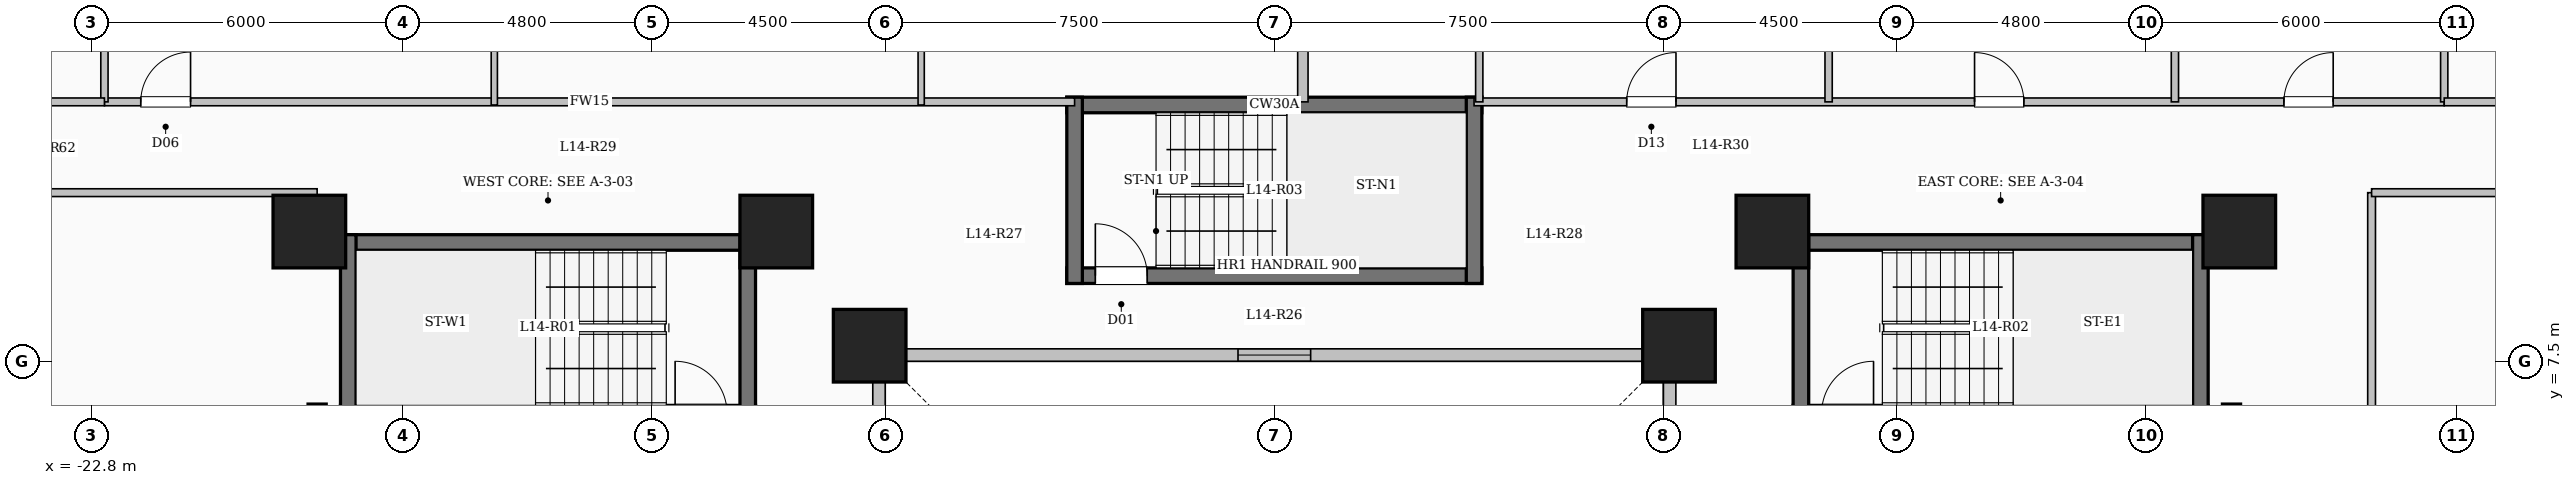
"""IFC4 building model, lengths in metres.
Left out: names, types, materials, properties, quantities, classifications, styles, units other than length and angle.
Written with IfcOpenShell. Run it as: python <this file> out.ifc"""

import sys

from ifc_helpers import new_model, si_unit, direction, frame, frame_2d, origin, origin_2d, place, context, subcontext, project, spatial, rectangle, extrude, element, fill, save


model = new_model("IFC4")
c1 = context("Model", 3, precision=1e-05, world=origin(), true_north=direction((0.0, 1.0)))
c2 = subcontext(c1, "Body", "Model", "MODEL_VIEW")
j1 = project(units=[si_unit("LENGTHUNIT", "METRE"), si_unit("PLANEANGLEUNIT", "RADIAN")], contexts=[c1])
p1 = place(None, origin())
s1 = spatial("IfcSite", under=j1, at=p1, CompositionType="ELEMENT")
p2 = place(p1, origin())
s2 = spatial("IfcBuilding", under=s1, at=p2, CompositionType="ELEMENT")
p3 = place(p2, frame((0.0, 0.0, 54.15)))
s3 = spatial("IfcBuildingStorey", under=s2, at=p3, CompositionType="ELEMENT", Elevation=54.15)
for number, where, z_axis, x_axis in (
    (1, (-7.8, 7.8, 0.0), (0.0, 0.0, 1.0), (1.0, 0.0, 0.0)),
    (2, (7.8, 7.8, 0.0), (0.0, 0.0, 1.0), (1.0, 0.0, 0.0)),
    (3, (-9.6, 10.0, 0.0), (0.0, 0.0, 1.0), (1.0, 0.0, 0.0)),
    (4, (9.6, 10.0, 0.0), (0.0, 0.0, 1.0), (1.0, 0.0, 0.0)),
    (5, (-18.6, 10.0, 0.0), (0.0, 0.0, 1.0), (1.0, 0.0, 0.0)),
    (6, (18.6, 10.0, 0.0), (0.0, 0.0, 1.0), (1.0, 0.0, 0.0)),
):
    element("IfcColumn", number, at=place(p3, frame(where, z_axis=z_axis, x_axis=x_axis)), inside=s3, PredefinedType="COLUMN", context=c2, shape_type="SweptSolid", body=[
        extrude(rectangle(XDim=1.4, YDim=1.4, at=origin_2d()), origin(), (0.0, 0.0, 1.0), 3.35),
    ])
p4 = place(p3, frame((7.62, -7.62, 0.0), z_axis=(0.0, 0.0, 1.0), x_axis=(0.0, 1.0, 0.0)))
e7 = element("IfcWall", 7, at=p4, inside=s3, PredefinedType="SOLIDWALL", context=c2, shape_type="SweptSolid", body=[
    extrude(rectangle(XDim=15.24, YDim=0.24, at=frame_2d((7.62, 0.0))), origin(), (0.0, 0.0, 1.0), 3.1),
])
p5 = place(p4, frame((6.92, 0.0, 0.95)))
e8 = element("IfcOpeningElement", 8, at=p5, cuts=e7, PredefinedType="OPENING", context=c2, shape_type="SweptSolid", body=[
    extrude(rectangle(XDim=1.4, YDim=1.5, at=frame_2d((0.7, 0.75))), frame((0.0, 0.13, 0.0), z_axis=(0.0, -1.0, 0.0), x_axis=(1.0, 0.0, 0.0)), (0.0, 0.0, 1.0), 0.26),
])
p6 = place(p3, frame((7.62, 7.62, 0.0), z_axis=(0.0, 0.0, 1.0), x_axis=(-1.0, 0.0, 0.0)))
e9 = element("IfcWall", 9, at=p6, inside=s3, PredefinedType="SOLIDWALL", context=c2, shape_type="SweptSolid", body=[
    extrude(rectangle(XDim=15.24, YDim=0.24, at=frame_2d((7.62, 0.0))), origin(), (0.0, 0.0, 1.0), 3.1),
])
p7 = place(p6, frame((6.92, 0.0, 0.95)))
e10 = element("IfcOpeningElement", 10, at=p7, cuts=e9, PredefinedType="OPENING", context=c2, shape_type="SweptSolid", body=[
    extrude(rectangle(XDim=1.4, YDim=1.5, at=frame_2d((0.7, 0.75))), frame((0.0, 0.13, 0.0), z_axis=(0.0, -1.0, 0.0), x_axis=(1.0, 0.0, 0.0)), (0.0, 0.0, 1.0), 0.26),
])
p8 = place(p3, frame((-7.62, 7.62, 0.0), z_axis=(0.0, 0.0, 1.0), x_axis=(0.0, -1.0, 0.0)))
e11 = element("IfcWall", 11, at=p8, inside=s3, PredefinedType="SOLIDWALL", context=c2, shape_type="SweptSolid", body=[
    extrude(rectangle(XDim=15.24, YDim=0.24, at=frame_2d((7.62, 0.0))), origin(), (0.0, 0.0, 1.0), 3.1),
])
p9 = place(p8, frame((6.92, 0.0, 0.95)))
e12 = element("IfcOpeningElement", 12, at=p9, cuts=e11, PredefinedType="OPENING", context=c2, shape_type="SweptSolid", body=[
    extrude(rectangle(XDim=1.4, YDim=1.5, at=frame_2d((0.7, 0.75))), frame((0.0, 0.13, 0.0), z_axis=(0.0, -1.0, 0.0), x_axis=(1.0, 0.0, 0.0)), (0.0, 0.0, 1.0), 0.26),
])
p10 = place(p3, frame((-18.0, 9.79, 0.0), z_axis=(0.0, 0.0, 1.0), x_axis=(1.0, 0.0, 0.0)))
e13 = element("IfcWall", 13, at=p10, inside=s3, PredefinedType="SHEAR", context=c2, shape_type="SweptSolid", body=[
    extrude(rectangle(XDim=8.0, YDim=0.3, at=frame_2d((4.0, 0.0))), origin(), (0.0, 0.0, 1.0), 3.35),
])
p11 = place(p3, frame((-18.0, 6.5, 0.0), z_axis=(0.0, 0.0, 1.0), x_axis=(1.0, 0.0, 0.0)))
e14 = element("IfcWall", 14, at=p11, inside=s3, PredefinedType="SHEAR", context=c2, shape_type="SweptSolid", body=[
    extrude(rectangle(XDim=8.0, YDim=0.3, at=frame_2d((4.0, 0.0))), origin(), (0.0, 0.0, 1.0), 3.35),
])
p12 = place(p11, frame((6.45, 0.0, 0.0)))
e15 = element("IfcOpeningElement", 15, at=p12, cuts=e14, PredefinedType="OPENING", context=c2, shape_type="SweptSolid", body=[
    extrude(rectangle(XDim=1.0, YDim=2.15, at=frame_2d((0.5, 1.075))), frame((0.0, 0.16, 0.0), z_axis=(0.0, -1.0, 0.0), x_axis=(1.0, 0.0, 0.0)), (0.0, 0.0, 1.0), 0.32),
])
for number, where, z_axis, x_axis in (
    (16, (-17.85, 6.35, 0.0), (0.0, 0.0, 1.0), (0.0, 1.0, 0.0)),
    (17, (-10.15, 6.35, 0.0), (0.0, 0.0, 1.0), (0.0, 1.0, 0.0)),
):
    element("IfcWall", number, at=place(p3, frame(where, z_axis=z_axis, x_axis=x_axis)), inside=s3, PredefinedType="SHEAR", context=c2, shape_type="SweptSolid", body=[
        extrude(rectangle(XDim=3.59, YDim=0.3, at=frame_2d((1.795, 0.0))), origin(), (0.0, 0.0, 1.0), 3.35),
    ])
p13 = place(p3, frame((10.0, 9.79, 0.0), z_axis=(0.0, 0.0, 1.0), x_axis=(1.0, 0.0, 0.0)))
e18 = element("IfcWall", 18, at=p13, inside=s3, PredefinedType="SHEAR", context=c2, shape_type="SweptSolid", body=[
    extrude(rectangle(XDim=8.0, YDim=0.3, at=frame_2d((4.0, 0.0))), origin(), (0.0, 0.0, 1.0), 3.35),
])
p14 = place(p3, frame((10.0, 6.5, 0.0), z_axis=(0.0, 0.0, 1.0), x_axis=(1.0, 0.0, 0.0)))
e19 = element("IfcWall", 19, at=p14, inside=s3, PredefinedType="SHEAR", context=c2, shape_type="SweptSolid", body=[
    extrude(rectangle(XDim=8.0, YDim=0.3, at=frame_2d((4.0, 0.0))), origin(), (0.0, 0.0, 1.0), 3.35),
])
p15 = place(p14, frame((0.55, 0.0, 0.0)))
e20 = element("IfcOpeningElement", 20, at=p15, cuts=e19, PredefinedType="OPENING", context=c2, shape_type="SweptSolid", body=[
    extrude(rectangle(XDim=1.0, YDim=2.15, at=frame_2d((0.5, 1.075))), frame((0.0, 0.16, 0.0), z_axis=(0.0, -1.0, 0.0), x_axis=(1.0, 0.0, 0.0)), (0.0, 0.0, 1.0), 0.32),
])
for number, where, z_axis, x_axis in (
    (21, (10.15, 6.35, 0.0), (0.0, 0.0, 1.0), (0.0, 1.0, 0.0)),
    (22, (17.85, 6.35, 0.0), (0.0, 0.0, 1.0), (0.0, 1.0, 0.0)),
):
    element("IfcWall", number, at=place(p3, frame(where, z_axis=z_axis, x_axis=x_axis)), inside=s3, PredefinedType="SHEAR", context=c2, shape_type="SweptSolid", body=[
        extrude(rectangle(XDim=3.59, YDim=0.3, at=frame_2d((1.795, 0.0))), origin(), (0.0, 0.0, 1.0), 3.35),
    ])
p16 = place(p3, frame((-4.0, 12.44, 0.0), z_axis=(0.0, 0.0, 1.0), x_axis=(1.0, 0.0, 0.0)))
e23 = element("IfcWall", 23, at=p16, inside=s3, PredefinedType="SHEAR", context=c2, shape_type="SweptSolid", body=[
    extrude(rectangle(XDim=8.0, YDim=0.3, at=frame_2d((4.0, 0.0))), origin(), (0.0, 0.0, 1.0), 3.35),
])
p17 = place(p3, frame((-4.0, 9.15, 0.0), z_axis=(0.0, 0.0, 1.0), x_axis=(1.0, 0.0, 0.0)))
e24 = element("IfcWall", 24, at=p17, inside=s3, PredefinedType="SHEAR", context=c2, shape_type="SweptSolid", body=[
    extrude(rectangle(XDim=8.0, YDim=0.3, at=frame_2d((4.0, 0.0))), origin(), (0.0, 0.0, 1.0), 3.35),
])
p18 = place(p17, frame((0.55, 0.0, 0.0)))
e25 = element("IfcOpeningElement", 25, at=p18, cuts=e24, PredefinedType="OPENING", context=c2, shape_type="SweptSolid", body=[
    extrude(rectangle(XDim=1.0, YDim=2.15, at=frame_2d((0.5, 1.075))), frame((0.0, 0.16, 0.0), z_axis=(0.0, -1.0, 0.0), x_axis=(1.0, 0.0, 0.0)), (0.0, 0.0, 1.0), 0.32),
])
for number, where, z_axis, x_axis in (
    (26, (-3.85, 9.0, 0.0), (0.0, 0.0, 1.0), (0.0, 1.0, 0.0)),
    (27, (3.85, 9.0, 0.0), (0.0, 0.0, 1.0), (0.0, 1.0, 0.0)),
):
    element("IfcWall", number, at=place(p3, frame(where, z_axis=z_axis, x_axis=x_axis)), inside=s3, PredefinedType="SHEAR", context=c2, shape_type="SweptSolid", body=[
        extrude(rectangle(XDim=3.59, YDim=0.3, at=frame_2d((1.795, 0.0))), origin(), (0.0, 0.0, 1.0), 3.35),
    ])
for number, where, z_axis, x_axis in (
    (28, (-18.45, -7.375, 0.0), (0.0, 0.0, 1.0), (0.0, 1.0, 0.0)),
    (29, (18.45, -7.375, 0.0), (0.0, 0.0, 1.0), (0.0, 1.0, 0.0)),
):
    element("IfcWall", number, at=place(p3, frame(where, z_axis=z_axis, x_axis=x_axis)), inside=s3, PredefinedType="SHEAR", context=c2, shape_type="SweptSolid", body=[
        extrude(rectangle(XDim=14.05, YDim=0.35, at=frame_2d((7.025, 0.0))), origin(), (0.0, 0.0, 1.0), 3.35),
    ])
p19 = place(p3, frame((-22.55, 12.5, 0.0), z_axis=(0.0, 0.0, 1.0), x_axis=(1.0, 0.0, 0.0)))
e30 = element("IfcWall", 30, at=p19, inside=s3, PredefinedType="PARTITIONING", context=c2, shape_type="SweptSolid", body=[
    extrude(rectangle(XDim=18.7, YDim=0.15, at=frame_2d((9.35, 0.0))), origin(), (0.0, 0.0, 1.0), 3.1),
])
p20 = place(p19, frame((0.7, 0.0, 0.0)))
e31 = element("IfcOpeningElement", 31, at=p20, cuts=e30, PredefinedType="OPENING", context=c2, shape_type="SweptSolid", body=[
    extrude(rectangle(XDim=0.96, YDim=2.15, at=frame_2d((0.48, 1.075))), frame((0.0, 0.085, 0.0), z_axis=(0.0, -1.0, 0.0), x_axis=(1.0, 0.0, 0.0)), (0.0, 0.0, 1.0), 0.17),
])
p21 = place(p3, frame((3.85, 12.5, 0.0), z_axis=(0.0, 0.0, 1.0), x_axis=(1.0, 0.0, 0.0)))
e32 = element("IfcWall", 32, at=p21, inside=s3, PredefinedType="PARTITIONING", context=c2, shape_type="SweptSolid", body=[
    extrude(rectangle(XDim=18.7, YDim=0.15, at=frame_2d((9.35, 0.0))), origin(), (0.0, 0.0, 1.0), 3.1),
])
p22 = place(p21, frame((2.942, 0.0, 0.0)))
e33 = element("IfcOpeningElement", 33, at=p22, cuts=e32, PredefinedType="OPENING", context=c2, shape_type="SweptSolid", body=[
    extrude(rectangle(XDim=0.95, YDim=2.15, at=frame_2d((0.475, 1.075))), frame((0.0, 0.085, 0.0), z_axis=(0.0, -1.0, 0.0), x_axis=(1.0, 0.0, 0.0)), (0.0, 0.0, 1.0), 0.17),
])
p23 = place(p21, frame((9.647, 0.0, 0.0)))
e34 = element("IfcOpeningElement", 34, at=p23, cuts=e32, PredefinedType="OPENING", context=c2, shape_type="SweptSolid", body=[
    extrude(rectangle(XDim=0.95, YDim=2.15, at=frame_2d((0.475, 1.075))), frame((0.0, 0.085, 0.0), z_axis=(0.0, -1.0, 0.0), x_axis=(1.0, 0.0, 0.0)), (0.0, 0.0, 1.0), 0.17),
])
p24 = place(p21, frame((15.61, 0.0, 0.0)))
e35 = element("IfcOpeningElement", 35, at=p24, cuts=e32, PredefinedType="OPENING", context=c2, shape_type="SweptSolid", body=[
    extrude(rectangle(XDim=0.95, YDim=2.15, at=frame_2d((0.475, 1.075))), frame((0.0, 0.085, 0.0), z_axis=(0.0, -1.0, 0.0), x_axis=(1.0, 0.0, 0.0)), (0.0, 0.0, 1.0), 0.17),
])
p25 = place(p3, frame((21.15, -7.25, 0.0), z_axis=(0.0, 0.0, 1.0), x_axis=(0.0, 1.0, 0.0)))
e36 = element("IfcWall", 36, at=p25, inside=s3, PredefinedType="PARTITIONING", context=c2, shape_type="SweptSolid", body=[
    extrude(rectangle(XDim=18.0, YDim=0.15, at=frame_2d((9.0, 0.0))), origin(), (0.0, 0.0, 1.0), 2.585),
])
p26 = place(p3, frame((0.55, 12.5, 0.0), z_axis=(0.0, 0.0, 1.0), x_axis=(0.0, 1.0, 0.0)))
e37 = element("IfcWall", 37, at=p26, inside=s3, PredefinedType="SOLIDWALL", context=c2, shape_type="SweptSolid", body=[
    extrude(rectangle(XDim=12.58, YDim=0.2, at=frame_2d((6.29, 0.0))), origin(), (0.0, 0.0, 1.0), 3.1),
])
p27 = place(p3, frame((-15.035, 12.44, 0.0), z_axis=(0.0, 0.0, 1.0), x_axis=(0.0, 1.0, 0.0)))
e38 = element("IfcWall", 38, at=p27, inside=s3, PredefinedType="PARTITIONING", context=c2, shape_type="SweptSolid", body=[
    extrude(rectangle(XDim=11.16, YDim=0.12, at=frame_2d((5.58, 0.0))), origin(), (0.0, 0.0, 1.0), 2.435),
])
p28 = place(p27, frame((2.905, 0.0, 0.0)))
e39 = element("IfcOpeningElement", 39, at=p28, cuts=e38, PredefinedType="OPENING", context=c2, shape_type="SweptSolid", body=[
    extrude(rectangle(XDim=1.08, YDim=2.15, at=frame_2d((0.54, 1.075))), frame((0.0, 0.07, 0.0), z_axis=(0.0, -1.0, 0.0), x_axis=(1.0, 0.0, 0.0)), (0.0, 0.0, 1.0), 0.14),
])
p29 = place(p3, frame((-6.807, 12.44, 0.0), z_axis=(0.0, 0.0, 1.0), x_axis=(0.0, 1.0, 0.0)))
e40 = element("IfcWall", 40, at=p29, inside=s3, PredefinedType="PARTITIONING", context=c2, shape_type="SweptSolid", body=[
    extrude(rectangle(XDim=2.62, YDim=0.12, at=frame_2d((1.31, 0.0))), origin(), (0.0, 0.0, 1.0), 3.1),
])
p30 = place(p3, frame((3.95, 12.5, 0.0), z_axis=(0.0, 0.0, 1.0), x_axis=(0.0, 1.0, 0.0)))
e41 = element("IfcWall", 41, at=p30, inside=s3, PredefinedType="PARTITIONING", context=c2, shape_type="SweptSolid", body=[
    extrude(rectangle(XDim=11.05, YDim=0.14, at=frame_2d((5.525, 0.0))), origin(), (0.0, 0.0, 1.0), 3.1),
])
p31 = place(p30, frame((1.2, 0.0, 0.0)))
e42 = element("IfcOpeningElement", 42, at=p31, cuts=e41, PredefinedType="OPENING", context=c2, shape_type="SweptSolid", body=[
    extrude(rectangle(XDim=0.95, YDim=2.15, at=frame_2d((0.475, 1.075))), frame((0.0, 0.08, 0.0), z_axis=(0.0, -1.0, 0.0), x_axis=(1.0, 0.0, 0.0)), (0.0, 0.0, 1.0), 0.16),
])
for number, where, z_axis, x_axis in (
    (43, (10.684, 12.5, 0.0), (0.0, 0.0, 1.0), (0.0, 1.0, 0.0)),
    (44, (17.359, 12.5, 0.0), (0.0, 0.0, 1.0), (0.0, 1.0, 0.0)),
):
    element("IfcWall", number, at=place(p3, frame(where, z_axis=z_axis, x_axis=x_axis)), inside=s3, PredefinedType="PARTITIONING", context=c2, shape_type="SweptSolid", body=[
        extrude(rectangle(XDim=11.05, YDim=0.14, at=frame_2d((5.525, 0.0))), origin(), (0.0, 0.0, 1.0), 3.1),
    ])
p32 = place(p3, frame((-28.68, 10.75, 0.0), z_axis=(0.0, 0.0, 1.0), x_axis=(1.0, 0.0, 0.0)))
e45 = element("IfcWall", 45, at=p32, inside=s3, PredefinedType="PARTITIONING", context=c2, shape_type="SweptSolid", body=[
    extrude(rectangle(XDim=10.23, YDim=0.15, at=frame_2d((5.115, 0.0))), origin(), (0.0, 0.0, 1.0), 3.1),
])
p33 = place(p3, frame((21.15, 10.75, 0.0), z_axis=(0.0, 0.0, 1.0), x_axis=(1.0, 0.0, 0.0)))
e46 = element("IfcWall", 46, at=p33, inside=s3, PredefinedType="PARTITIONING", context=c2, shape_type="SweptSolid", body=[
    extrude(rectangle(XDim=7.53, YDim=0.15, at=frame_2d((3.765, 0.0))), origin(), (0.0, 0.0, 1.0), 3.1),
])
for number, where, z_axis, x_axis in (
    (47, (-22.55, 12.5, 0.0), (0.0, 0.0, 1.0), (0.0, 1.0, 0.0)),
    (48, (22.55, 12.5, 0.0), (0.0, 0.0, 1.0), (0.0, 1.0, 0.0)),
):
    element("IfcWall", number, at=place(p3, frame(where, z_axis=z_axis, x_axis=x_axis)), inside=s3, PredefinedType="PARTITIONING", context=c2, shape_type="SweptSolid", body=[
        extrude(rectangle(XDim=6.55, YDim=0.14, at=frame_2d((3.275, 0.0))), origin(), (0.0, 0.0, 1.0), 3.1),
    ])
p34 = place(p3, frame((-28.68, 12.5, 0.0), z_axis=(0.0, 0.0, 1.0), x_axis=(1.0, 0.0, 0.0)))
e49 = element("IfcWall", 49, at=p34, inside=s3, PredefinedType="PARTITIONING", context=c2, shape_type="SweptSolid", body=[
    extrude(rectangle(XDim=6.13, YDim=0.15, at=frame_2d((3.065, 0.0))), origin(), (0.0, 0.0, 1.0), 3.1),
])
p35 = place(p34, frame((2.59, 0.0, 0.0)))
e50 = element("IfcOpeningElement", 50, at=p35, cuts=e49, PredefinedType="OPENING", context=c2, shape_type="SweptSolid", body=[
    extrude(rectangle(XDim=0.95, YDim=2.15, at=frame_2d((0.475, 1.075))), frame((0.0, 0.085, 0.0), z_axis=(0.0, -1.0, 0.0), x_axis=(1.0, 0.0, 0.0)), (0.0, 0.0, 1.0), 0.17),
])
p36 = place(p3, frame((22.55, 12.5, 0.0), z_axis=(0.0, 0.0, 1.0), x_axis=(1.0, 0.0, 0.0)))
e51 = element("IfcWall", 51, at=p36, inside=s3, PredefinedType="PARTITIONING", context=c2, shape_type="SweptSolid", body=[
    extrude(rectangle(XDim=6.13, YDim=0.15, at=frame_2d((3.065, 0.0))), origin(), (0.0, 0.0, 1.0), 3.1),
])
p37 = place(p36, frame((2.59, 0.0, 0.0)))
e52 = element("IfcOpeningElement", 52, at=p37, cuts=e51, PredefinedType="OPENING", context=c2, shape_type="SweptSolid", body=[
    extrude(rectangle(XDim=0.95, YDim=2.15, at=frame_2d((0.475, 1.075))), frame((0.0, 0.085, 0.0), z_axis=(0.0, -1.0, 0.0), x_axis=(1.0, 0.0, 0.0)), (0.0, 0.0, 1.0), 0.17),
])
p38 = place(p7, origin())
e53 = element("IfcWindow", 53, at=p38, inside=s3, PartitioningType="SINGLE_PANEL", PredefinedType="WINDOW", context=c2, shape_type="SweptSolid", body=[
    extrude(rectangle(XDim=1.4, YDim=1.5, at=frame_2d((0.7, 0.75))), frame((0.0, 0.03, 0.0), z_axis=(0.0, -1.0, 0.0), x_axis=(1.0, 0.0, 0.0)), (0.0, 0.0, 1.0), 0.06),
])
fill(e10, e53)
p39 = place(p18, origin())
e54 = element("IfcDoor", 54, at=p39, inside=s3, OperationType="SINGLE_SWING_LEFT", PredefinedType="DOOR", context=c2, shape_type="SweptSolid", body=[
    extrude(rectangle(XDim=1.0, YDim=2.15, at=frame_2d((0.5, 1.075))), frame((0.0, 0.025, 0.0), z_axis=(0.0, -1.0, 0.0), x_axis=(1.0, 0.0, 0.0)), (0.0, 0.0, 1.0), 0.05),
])
fill(e25, e54)
p40 = place(p20, origin())
e55 = element("IfcDoor", 55, at=p40, inside=s3, OperationType="SINGLE_SWING_RIGHT", PredefinedType="DOOR", context=c2, shape_type="SweptSolid", body=[
    extrude(rectangle(XDim=0.96, YDim=2.15, at=frame_2d((0.48, 1.075))), frame((0.0, 0.025, 0.0), z_axis=(0.0, -1.0, 0.0), x_axis=(1.0, 0.0, 0.0)), (0.0, 0.0, 1.0), 0.05),
])
fill(e31, e55)
p41 = place(p22, origin())
e56 = element("IfcDoor", 56, at=p41, inside=s3, OperationType="SINGLE_SWING_RIGHT", PredefinedType="DOOR", context=c2, shape_type="SweptSolid", body=[
    extrude(rectangle(XDim=0.95, YDim=2.15, at=frame_2d((0.475, 1.075))), frame((0.0, 0.025, 0.0), z_axis=(0.0, -1.0, 0.0), x_axis=(1.0, 0.0, 0.0)), (0.0, 0.0, 1.0), 0.05),
])
fill(e33, e56)
p42 = place(p23, origin())
e57 = element("IfcDoor", 57, at=p42, inside=s3, OperationType="SINGLE_SWING_LEFT", PredefinedType="DOOR", context=c2, shape_type="SweptSolid", body=[
    extrude(rectangle(XDim=0.95, YDim=2.15, at=frame_2d((0.475, 1.075))), frame((0.0, 0.025, 0.0), z_axis=(0.0, -1.0, 0.0), x_axis=(1.0, 0.0, 0.0)), (0.0, 0.0, 1.0), 0.05),
])
fill(e34, e57)
p43 = place(p24, origin())
e58 = element("IfcDoor", 58, at=p43, inside=s3, OperationType="SINGLE_SWING_RIGHT", PredefinedType="DOOR", context=c2, shape_type="SweptSolid", body=[
    extrude(rectangle(XDim=0.95, YDim=2.15, at=frame_2d((0.475, 1.075))), frame((0.0, 0.025, 0.0), z_axis=(0.0, -1.0, 0.0), x_axis=(1.0, 0.0, 0.0)), (0.0, 0.0, 1.0), 0.05),
])
fill(e35, e58)
save(model, sys.argv[1])
